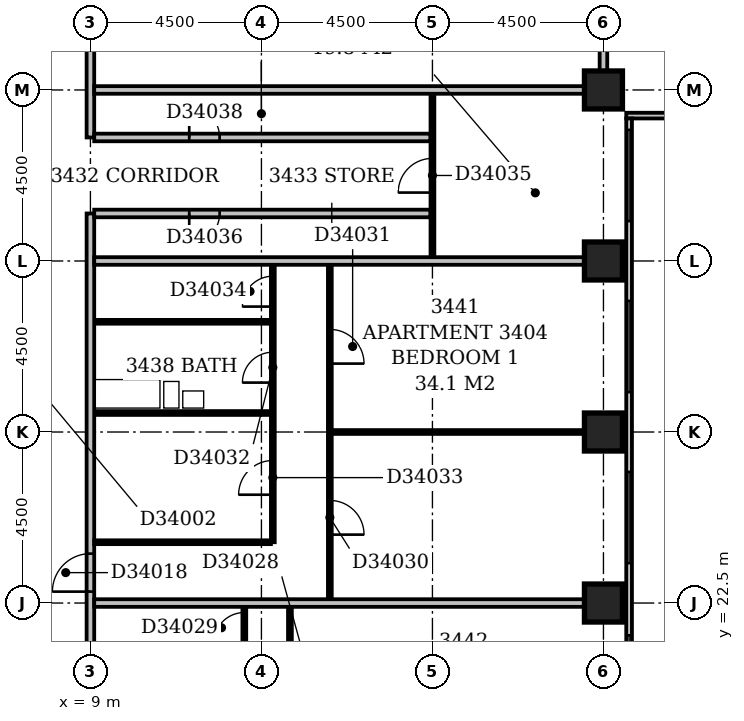
"""IFC4 building model, lengths in metres.
Left out: names, types, materials, properties, quantities, classifications, styles, units other than length and angle.
Written with IfcOpenShell. Run it as: python <this file> out.ifc"""

import sys

from ifc_helpers import new_model, si_unit, direction, frame, frame_2d, origin, origin_2d, place, context, subcontext, project, spatial, rectangle, extrude, element, fill, save


model = new_model("IFC4")
c1 = context("Model", 3, precision=1e-05, world=origin(), true_north=direction((0.0, 1.0)))
c2 = subcontext(c1, "Body", "Model", "MODEL_VIEW")
j1 = project(units=[si_unit("LENGTHUNIT", "METRE"), si_unit("PLANEANGLEUNIT", "RADIAN")], contexts=[c1])
p1 = place(None, origin())
s1 = spatial("IfcSite", under=j1, at=p1, CompositionType="ELEMENT")
p2 = place(p1, origin())
s2 = spatial("IfcBuilding", under=s1, at=p2, CompositionType="ELEMENT")
p3 = place(p2, frame((0.0, 0.0, 137.6)))
s3 = spatial("IfcBuildingStorey", under=s2, at=p3, CompositionType="ELEMENT", Elevation=137.6)
for number, where, z_axis, x_axis in (
    (1, (22.5, 22.5, -0.3), (0.0, 0.0, 1.0), (1.0, 0.0, 0.0)),
    (2, (22.5, 27.0, -0.3), (0.0, 0.0, 1.0), (1.0, 0.0, 0.0)),
    (3, (22.5, 31.5, -0.3), (0.0, 0.0, 1.0), (1.0, 0.0, 0.0)),
    (4, (22.5, 36.0, -0.3), (0.0, 0.0, 1.0), (1.0, 0.0, 0.0)),
):
    element("IfcColumn", number, at=place(p3, frame(where, z_axis=z_axis, x_axis=x_axis)), inside=s3, PredefinedType="COLUMN", context=c2, shape_type="SweptSolid", body=[
        extrude(rectangle(XDim=1.0, YDim=1.0, at=origin_2d()), origin(), (0.0, 0.0, 1.0), 3.6),
    ])
p4 = place(p3, frame((23.175, 17.4, 0.0), z_axis=(0.0, 0.0, 1.0), x_axis=(0.0, 1.0, 0.0)))
e5 = element("IfcWall", 5, at=p4, inside=s3, PredefinedType="STANDARD", context=c2, shape_type="SweptSolid", body=[
    extrude(rectangle(XDim=17.85, YDim=0.15, at=frame_2d((8.925, 0.0))), origin(), (0.0, 0.0, 1.0), 2.7),
])
p5 = place(p4, frame((3.05, 0.0, 0.6)))
e6 = element("IfcOpeningElement", 6, at=p5, cuts=e5, PredefinedType="OPENING", context=c2, shape_type="SweptSolid", body=[
    extrude(rectangle(XDim=1.2, YDim=1.8, at=frame_2d((0.6, 0.9))), frame((0.0, 0.087, 0.0), z_axis=(0.0, -1.0, 0.0), x_axis=(1.0, 0.0, 0.0)), (0.0, 0.0, 1.0), 0.174),
])
p6 = place(p4, frame((6.15, 0.0, 0.6)))
e7 = element("IfcOpeningElement", 7, at=p6, cuts=e5, PredefinedType="OPENING", context=c2, shape_type="SweptSolid", body=[
    extrude(rectangle(XDim=2.4, YDim=1.8, at=frame_2d((1.2, 0.9))), frame((0.0, 0.087, 0.0), z_axis=(0.0, -1.0, 0.0), x_axis=(1.0, 0.0, 0.0)), (0.0, 0.0, 1.0), 0.174),
])
p7 = place(p4, frame((10.65, 0.0, 0.6)))
e8 = element("IfcOpeningElement", 8, at=p7, cuts=e5, PredefinedType="OPENING", context=c2, shape_type="SweptSolid", body=[
    extrude(rectangle(XDim=2.4, YDim=1.8, at=frame_2d((1.2, 0.9))), frame((0.0, 0.087, 0.0), z_axis=(0.0, -1.0, 0.0), x_axis=(1.0, 0.0, 0.0)), (0.0, 0.0, 1.0), 0.174),
])
p8 = place(p4, frame((15.15, 0.0, 0.6)))
e9 = element("IfcOpeningElement", 9, at=p8, cuts=e5, PredefinedType="OPENING", context=c2, shape_type="SweptSolid", body=[
    extrude(rectangle(XDim=2.4, YDim=1.8, at=frame_2d((1.2, 0.9))), frame((0.0, 0.087, 0.0), z_axis=(0.0, -1.0, 0.0), x_axis=(1.0, 0.0, 0.0)), (0.0, 0.0, 1.0), 0.174),
])
p9 = place(p3, frame((23.1, 35.325, 0.0), z_axis=(0.0, 0.0, 1.0), x_axis=(1.0, 0.0, 0.0)))
e10 = element("IfcWall", 10, at=p9, inside=s3, PredefinedType="STANDARD", context=c2, shape_type="SweptSolid", body=[
    extrude(rectangle(XDim=45.15, YDim=0.15, at=frame_2d((22.575, 0.0))), origin(), (0.0, 0.0, 1.0), 2.7),
])
p10 = place(p9, frame((2.235, 0.0, 0.6)))
e11 = element("IfcOpeningElement", 11, at=p10, cuts=e10, PredefinedType="OPENING", context=c2, shape_type="SweptSolid", body=[
    extrude(rectangle(XDim=0.9, YDim=1.8, at=frame_2d((0.45, 0.9))), frame((0.0, 0.087, 0.0), z_axis=(0.0, -1.0, 0.0), x_axis=(1.0, 0.0, 0.0)), (0.0, 0.0, 1.0), 0.174),
])
p11 = place(p9, frame((4.95, 0.0, 0.6)))
e12 = element("IfcOpeningElement", 12, at=p11, cuts=e10, PredefinedType="OPENING", context=c2, shape_type="SweptSolid", body=[
    extrude(rectangle(XDim=2.4, YDim=1.8, at=frame_2d((1.2, 0.9))), frame((0.0, 0.087, 0.0), z_axis=(0.0, -1.0, 0.0), x_axis=(1.0, 0.0, 0.0)), (0.0, 0.0, 1.0), 0.174),
])
p12 = place(p9, frame((9.45, 0.0, 0.6)))
e13 = element("IfcOpeningElement", 13, at=p12, cuts=e10, PredefinedType="OPENING", context=c2, shape_type="SweptSolid", body=[
    extrude(rectangle(XDim=2.4, YDim=1.8, at=frame_2d((1.2, 0.9))), frame((0.0, 0.087, 0.0), z_axis=(0.0, -1.0, 0.0), x_axis=(1.0, 0.0, 0.0)), (0.0, 0.0, 1.0), 0.174),
])
p13 = place(p9, frame((13.95, 0.0, 0.6)))
e14 = element("IfcOpeningElement", 14, at=p13, cuts=e10, PredefinedType="OPENING", context=c2, shape_type="SweptSolid", body=[
    extrude(rectangle(XDim=2.4, YDim=1.8, at=frame_2d((1.2, 0.9))), frame((0.0, 0.087, 0.0), z_axis=(0.0, -1.0, 0.0), x_axis=(1.0, 0.0, 0.0)), (0.0, 0.0, 1.0), 0.174),
])
p14 = place(p9, frame((18.45, 0.0, 0.6)))
e15 = element("IfcOpeningElement", 15, at=p14, cuts=e10, PredefinedType="OPENING", context=c2, shape_type="SweptSolid", body=[
    extrude(rectangle(XDim=2.4, YDim=1.8, at=frame_2d((1.2, 0.9))), frame((0.0, 0.087, 0.0), z_axis=(0.0, -1.0, 0.0), x_axis=(1.0, 0.0, 0.0)), (0.0, 0.0, 1.0), 0.174),
])
p15 = place(p9, frame((22.66, 0.0, 0.6)))
e16 = element("IfcOpeningElement", 16, at=p15, cuts=e10, PredefinedType="OPENING", context=c2, shape_type="SweptSolid", body=[
    extrude(rectangle(XDim=1.8, YDim=1.8, at=frame_2d((0.9, 0.9))), frame((0.0, 0.087, 0.0), z_axis=(0.0, -1.0, 0.0), x_axis=(1.0, 0.0, 0.0)), (0.0, 0.0, 1.0), 0.174),
])
p16 = place(p9, frame((28.911, 0.0, 0.6)))
e17 = element("IfcOpeningElement", 17, at=p16, cuts=e10, PredefinedType="OPENING", context=c2, shape_type="SweptSolid", body=[
    extrude(rectangle(XDim=1.2, YDim=1.8, at=frame_2d((0.6, 0.9))), frame((0.0, 0.087, 0.0), z_axis=(0.0, -1.0, 0.0), x_axis=(1.0, 0.0, 0.0)), (0.0, 0.0, 1.0), 0.174),
])
p17 = place(p9, frame((31.95, 0.0, 0.6)))
e18 = element("IfcOpeningElement", 18, at=p17, cuts=e10, PredefinedType="OPENING", context=c2, shape_type="SweptSolid", body=[
    extrude(rectangle(XDim=2.4, YDim=1.8, at=frame_2d((1.2, 0.9))), frame((0.0, 0.087, 0.0), z_axis=(0.0, -1.0, 0.0), x_axis=(1.0, 0.0, 0.0)), (0.0, 0.0, 1.0), 0.174),
])
p18 = place(p9, frame((36.45, 0.0, 0.6)))
e19 = element("IfcOpeningElement", 19, at=p18, cuts=e10, PredefinedType="OPENING", context=c2, shape_type="SweptSolid", body=[
    extrude(rectangle(XDim=2.4, YDim=1.8, at=frame_2d((1.2, 0.9))), frame((0.0, 0.087, 0.0), z_axis=(0.0, -1.0, 0.0), x_axis=(1.0, 0.0, 0.0)), (0.0, 0.0, 1.0), 0.174),
])
p19 = place(p9, frame((40.95, 0.0, 0.6)))
e20 = element("IfcOpeningElement", 20, at=p19, cuts=e10, PredefinedType="OPENING", context=c2, shape_type="SweptSolid", body=[
    extrude(rectangle(XDim=2.4, YDim=1.8, at=frame_2d((1.2, 0.9))), frame((0.0, 0.087, 0.0), z_axis=(0.0, -1.0, 0.0), x_axis=(1.0, 0.0, 0.0)), (0.0, 0.0, 1.0), 0.174),
])
p20 = place(p3, frame((9.0, 5.0, 0.0), z_axis=(0.0, 0.0, 1.0), x_axis=(0.0, 1.0, 0.0)))
e21 = element("IfcWall", 21, at=p20, inside=s3, PredefinedType="PARTITIONING", context=c2, shape_type="SweptSolid", body=[
    extrude(rectangle(XDim=27.75, YDim=0.2, at=frame_2d((13.875, 0.0))), origin(), (0.0, 0.0, 1.0), 3.3),
])
p21 = place(p20, frame((17.8, 0.0, 0.0)))
e22 = element("IfcOpeningElement", 22, at=p21, cuts=e21, PredefinedType="OPENING", context=c2, shape_type="SweptSolid", body=[
    extrude(rectangle(XDim=1.0, YDim=2.1, at=frame_2d((0.5, 1.05))), frame((0.0, 0.112, 0.0), z_axis=(0.0, -1.0, 0.0), x_axis=(1.0, 0.0, 0.0)), (0.0, 0.0, 1.0), 0.224),
])
p22 = place(p20, frame((14.95, 0.0, 0.0)))
e23 = element("IfcOpeningElement", 23, at=p22, cuts=e21, PredefinedType="OPENING", context=c2, shape_type="SweptSolid", body=[
    extrude(rectangle(XDim=1.0, YDim=2.1, at=frame_2d((0.5, 1.05))), frame((0.0, 0.112, 0.0), z_axis=(0.0, -1.0, 0.0), x_axis=(1.0, 0.0, 0.0)), (0.0, 0.0, 1.0), 0.224),
])
p23 = place(p20, frame((11.7, 0.0, 0.0)))
e24 = element("IfcOpeningElement", 24, at=p23, cuts=e21, PredefinedType="OPENING", context=c2, shape_type="SweptSolid", body=[
    extrude(rectangle(XDim=1.0, YDim=2.1, at=frame_2d((0.5, 1.05))), frame((0.0, 0.112, 0.0), z_axis=(0.0, -1.0, 0.0), x_axis=(1.0, 0.0, 0.0)), (0.0, 0.0, 1.0), 0.224),
])
p24 = place(p20, frame((1.5, 0.0, 0.0)))
e25 = element("IfcOpeningElement", 25, at=p24, cuts=e21, PredefinedType="OPENING", context=c2, shape_type="SweptSolid", body=[
    extrude(rectangle(XDim=0.9, YDim=2.1, at=frame_2d((0.45, 1.05))), frame((0.0, 0.112, 0.0), z_axis=(0.0, -1.0, 0.0), x_axis=(1.0, 0.0, 0.0)), (0.0, 0.0, 1.0), 0.224),
])
p25 = place(p3, frame((14.25, 18.1, 0.0), z_axis=(0.0, 0.0, 1.0), x_axis=(0.0, 1.0, 0.0)))
e26 = element("IfcWall", 26, at=p25, inside=s3, PredefinedType="PARTITIONING", context=c2, shape_type="SweptSolid", body=[
    extrude(rectangle(XDim=4.3, YDim=0.1, at=frame_2d((2.15, 0.0))), origin(), (0.0, 0.0, 1.0), 3.3),
])
p26 = place(p25, frame((1.7, 0.0, 0.0)))
e27 = element("IfcOpeningElement", 27, at=p26, cuts=e26, PredefinedType="OPENING", context=c2, shape_type="SweptSolid", body=[
    extrude(rectangle(XDim=0.9, YDim=2.1, at=frame_2d((0.45, 1.05))), frame((0.0, 0.062, 0.0), z_axis=(0.0, -1.0, 0.0), x_axis=(1.0, 0.0, 0.0)), (0.0, 0.0, 1.0), 0.124),
])
p27 = place(p3, frame((13.05, 21.2, 0.0), z_axis=(0.0, 0.0, 1.0), x_axis=(0.0, 1.0, 0.0)))
e28 = element("IfcWall", 28, at=p27, inside=s3, PredefinedType="PARTITIONING", context=c2, shape_type="SweptSolid", body=[
    extrude(rectangle(XDim=1.2, YDim=0.1, at=frame_2d((0.6, 0.0))), origin(), (0.0, 0.0, 1.0), 3.3),
])
p28 = place(p27, frame((0.25, 0.0, 0.0)))
e29 = element("IfcOpeningElement", 29, at=p28, cuts=e28, PredefinedType="OPENING", context=c2, shape_type="SweptSolid", body=[
    extrude(rectangle(XDim=0.8, YDim=2.1, at=frame_2d((0.4, 1.05))), frame((0.0, 0.062, 0.0), z_axis=(0.0, -1.0, 0.0), x_axis=(1.0, 0.0, 0.0)), (0.0, 0.0, 1.0), 0.124),
])
p29 = place(p3, frame((9.1, 22.5, 0.0), z_axis=(0.0, 0.0, 1.0), x_axis=(1.0, 0.0, 0.0)))
e30 = element("IfcWall", 30, at=p29, inside=s3, PredefinedType="PARTITIONING", context=c2, shape_type="SweptSolid", body=[
    extrude(rectangle(XDim=12.9, YDim=0.2, at=frame_2d((6.45, 0.0))), origin(), (0.0, 0.0, 1.0), 3.3),
])
p30 = place(p3, frame((15.3, 22.6, 0.0), z_axis=(0.0, 0.0, 1.0), x_axis=(0.0, 1.0, 0.0)))
e31 = element("IfcWall", 31, at=p30, inside=s3, PredefinedType="PARTITIONING", context=c2, shape_type="SweptSolid", body=[
    extrude(rectangle(XDim=8.8, YDim=0.1, at=frame_2d((4.4, 0.0))), origin(), (0.0, 0.0, 1.0), 3.3),
])
p31 = place(p30, frame((1.7, 0.0, 0.0)))
e32 = element("IfcOpeningElement", 32, at=p31, cuts=e31, PredefinedType="OPENING", context=c2, shape_type="SweptSolid", body=[
    extrude(rectangle(XDim=0.9, YDim=2.1, at=frame_2d((0.45, 1.05))), frame((0.0, 0.062, 0.0), z_axis=(0.0, -1.0, 0.0), x_axis=(1.0, 0.0, 0.0)), (0.0, 0.0, 1.0), 0.124),
])
p32 = place(p30, frame((6.2, 0.0, 0.0)))
e33 = element("IfcOpeningElement", 33, at=p32, cuts=e31, PredefinedType="OPENING", context=c2, shape_type="SweptSolid", body=[
    extrude(rectangle(XDim=0.9, YDim=2.1, at=frame_2d((0.45, 1.05))), frame((0.0, 0.062, 0.0), z_axis=(0.0, -1.0, 0.0), x_axis=(1.0, 0.0, 0.0)), (0.0, 0.0, 1.0), 0.124),
])
p33 = place(p3, frame((9.1, 24.1, 0.0), z_axis=(0.0, 0.0, 1.0), x_axis=(1.0, 0.0, 0.0)))
e34 = element("IfcWall", 34, at=p33, inside=s3, PredefinedType="PARTITIONING", context=c2, shape_type="SweptSolid", body=[
    extrude(rectangle(XDim=4.65, YDim=0.1, at=frame_2d((2.325, 0.0))), origin(), (0.0, 0.0, 1.0), 3.3),
])
p34 = place(p3, frame((13.8, 24.1, 0.0), z_axis=(0.0, 0.0, 1.0), x_axis=(0.0, 1.0, 0.0)))
e35 = element("IfcWall", 35, at=p34, inside=s3, PredefinedType="PARTITIONING", context=c2, shape_type="SweptSolid", body=[
    extrude(rectangle(XDim=7.3, YDim=0.1, at=frame_2d((3.65, 0.0))), origin(), (0.0, 0.0, 1.0), 3.3),
])
p35 = place(p34, frame((4.2, 0.0, 0.0)))
e36 = element("IfcOpeningElement", 36, at=p35, cuts=e35, PredefinedType="OPENING", context=c2, shape_type="SweptSolid", body=[
    extrude(rectangle(XDim=0.8, YDim=2.1, at=frame_2d((0.4, 1.05))), frame((0.0, 0.062, 0.0), z_axis=(0.0, -1.0, 0.0), x_axis=(1.0, 0.0, 0.0)), (0.0, 0.0, 1.0), 0.124),
])
p36 = place(p34, frame((1.25, 0.0, 0.0)))
e37 = element("IfcOpeningElement", 37, at=p36, cuts=e35, PredefinedType="OPENING", context=c2, shape_type="SweptSolid", body=[
    extrude(rectangle(XDim=0.9, YDim=2.1, at=frame_2d((0.45, 1.05))), frame((0.0, 0.062, 0.0), z_axis=(0.0, -1.0, 0.0), x_axis=(1.0, 0.0, 0.0)), (0.0, 0.0, 1.0), 0.124),
])
p37 = place(p34, frame((6.2, 0.0, 0.0)))
e38 = element("IfcOpeningElement", 38, at=p37, cuts=e35, PredefinedType="OPENING", context=c2, shape_type="SweptSolid", body=[
    extrude(rectangle(XDim=0.8, YDim=2.1, at=frame_2d((0.4, 1.05))), frame((0.0, 0.062, 0.0), z_axis=(0.0, -1.0, 0.0), x_axis=(1.0, 0.0, 0.0)), (0.0, 0.0, 1.0), 0.124),
])
p38 = place(p3, frame((15.35, 27.0, 0.0), z_axis=(0.0, 0.0, 1.0), x_axis=(1.0, 0.0, 0.0)))
e39 = element("IfcWall", 39, at=p38, inside=s3, PredefinedType="PARTITIONING", context=c2, shape_type="SweptSolid", body=[
    extrude(rectangle(XDim=6.65, YDim=0.1, at=frame_2d((3.325, 0.0))), origin(), (0.0, 0.0, 1.0), 2.7),
])
p39 = place(p3, frame((9.1, 27.5, 0.0), z_axis=(0.0, 0.0, 1.0), x_axis=(1.0, 0.0, 0.0)))
e40 = element("IfcWall", 40, at=p39, inside=s3, PredefinedType="PLUMBINGWALL", context=c2, shape_type="SweptSolid", body=[
    extrude(rectangle(XDim=4.65, YDim=0.1, at=frame_2d((2.325, 0.0))), origin(), (0.0, 0.0, 1.0), 2.7),
])
p40 = place(p3, frame((9.1, 29.9, 0.0), z_axis=(0.0, 0.0, 1.0), x_axis=(1.0, 0.0, 0.0)))
e41 = element("IfcWall", 41, at=p40, inside=s3, PredefinedType="PLUMBINGWALL", context=c2, shape_type="SweptSolid", body=[
    extrude(rectangle(XDim=4.65, YDim=0.1, at=frame_2d((2.325, 0.0))), origin(), (0.0, 0.0, 1.0), 3.3),
])
p41 = place(p3, frame((9.1, 31.5, 0.0), z_axis=(0.0, 0.0, 1.0), x_axis=(1.0, 0.0, 0.0)))
e42 = element("IfcWall", 42, at=p41, inside=s3, PredefinedType="PARTITIONING", context=c2, shape_type="SweptSolid", body=[
    extrude(rectangle(XDim=12.9, YDim=0.2, at=frame_2d((6.45, 0.0))), origin(), (0.0, 0.0, 1.0), 3.3),
])
p42 = place(p3, frame((18.0, 31.6, 0.0), z_axis=(0.0, 0.0, 1.0), x_axis=(0.0, 1.0, 0.0)))
e43 = element("IfcWall", 43, at=p42, inside=s3, PredefinedType="PARTITIONING", context=c2, shape_type="SweptSolid", body=[
    extrude(rectangle(XDim=4.3, YDim=0.1, at=frame_2d((2.15, 0.0))), origin(), (0.0, 0.0, 1.0), 3.3),
])
p43 = place(p42, frame((1.7, 0.0, 0.0)))
e44 = element("IfcOpeningElement", 44, at=p43, cuts=e43, PredefinedType="OPENING", context=c2, shape_type="SweptSolid", body=[
    extrude(rectangle(XDim=0.9, YDim=2.1, at=frame_2d((0.45, 1.05))), frame((0.0, 0.062, 0.0), z_axis=(0.0, -1.0, 0.0), x_axis=(1.0, 0.0, 0.0)), (0.0, 0.0, 1.0), 0.124),
])
p44 = place(p3, frame((9.1, 32.75, 0.0), z_axis=(0.0, 0.0, 1.0), x_axis=(1.0, 0.0, 0.0)))
e45 = element("IfcWall", 45, at=p44, inside=s3, PredefinedType="PARTITIONING", context=c2, shape_type="SweptSolid", body=[
    extrude(rectangle(XDim=8.85, YDim=0.2, at=frame_2d((4.425, 0.0))), origin(), (0.0, 0.0, 1.0), 3.3),
])
p45 = place(p44, frame((2.5, 0.0, 0.0)))
e46 = element("IfcOpeningElement", 46, at=p45, cuts=e45, PredefinedType="OPENING", context=c2, shape_type="SweptSolid", body=[
    extrude(rectangle(XDim=0.8, YDim=2.1, at=frame_2d((0.4, 1.05))), frame((0.0, 0.112, 0.0), z_axis=(0.0, -1.0, 0.0), x_axis=(1.0, 0.0, 0.0)), (0.0, 0.0, 1.0), 0.224),
])
p46 = place(p3, frame((9.0, 34.75, 0.0), z_axis=(0.0, 0.0, 1.0), x_axis=(0.0, 1.0, 0.0)))
e47 = element("IfcWall", 47, at=p46, inside=s3, PredefinedType="PARTITIONING", context=c2, shape_type="SweptSolid", body=[
    extrude(rectangle(XDim=14.75, YDim=0.2, at=frame_2d((7.375, 0.0))), origin(), (0.0, 0.0, 1.0), 3.3),
])
p47 = place(p46, frame((5.25, 0.0, 0.0)))
e48 = element("IfcOpeningElement", 48, at=p47, cuts=e47, PredefinedType="OPENING", context=c2, shape_type="SweptSolid", body=[
    extrude(rectangle(XDim=0.9, YDim=2.1, at=frame_2d((0.45, 1.05))), frame((0.0, 0.112, 0.0), z_axis=(0.0, -1.0, 0.0), x_axis=(1.0, 0.0, 0.0)), (0.0, 0.0, 1.0), 0.224),
])
p48 = place(p3, frame((9.1, 34.75, 0.0), z_axis=(0.0, 0.0, 1.0), x_axis=(1.0, 0.0, 0.0)))
e49 = element("IfcWall", 49, at=p48, inside=s3, PredefinedType="PARTITIONING", context=c2, shape_type="SweptSolid", body=[
    extrude(rectangle(XDim=8.85, YDim=0.2, at=frame_2d((4.425, 0.0))), origin(), (0.0, 0.0, 1.0), 3.3),
])
p49 = place(p48, frame((2.5, 0.0, 0.0)))
e50 = element("IfcOpeningElement", 50, at=p49, cuts=e49, PredefinedType="OPENING", context=c2, shape_type="SweptSolid", body=[
    extrude(rectangle(XDim=0.8, YDim=2.1, at=frame_2d((0.4, 1.05))), frame((0.0, 0.112, 0.0), z_axis=(0.0, -1.0, 0.0), x_axis=(1.0, 0.0, 0.0)), (0.0, 0.0, 1.0), 0.224),
])
for number, where, z_axis, x_axis in (
    (51, (9.1, 36.0, 0.0), (0.0, 0.0, 1.0), (1.0, 0.0, 0.0)),
    (52, (22.5, 36.5, 0.0), (0.0, 0.0, 1.0), (0.0, 1.0, 0.0)),
):
    element("IfcWall", number, at=place(p3, frame(where, z_axis=z_axis, x_axis=x_axis)), inside=s3, PredefinedType="PARTITIONING", context=c2, shape_type="SweptSolid", body=[
        extrude(rectangle(XDim=12.9, YDim=0.2, at=frame_2d((6.45, 0.0))), origin(), (0.0, 0.0, 1.0), 3.3),
    ])
p50 = place(p5, origin())
e53 = element("IfcWindow", 53, at=p50, inside=s3, PartitioningType="SINGLE_PANEL", PredefinedType="WINDOW", context=c2, shape_type="SweptSolid", body=[
    extrude(rectangle(XDim=1.2, YDim=1.8, at=frame_2d((0.6, 0.9))), frame((0.0, 0.03, 0.0), z_axis=(0.0, -1.0, 0.0), x_axis=(1.0, 0.0, 0.0)), (0.0, 0.0, 1.0), 0.06),
])
fill(e6, e53)
p51 = place(p6, origin())
e54 = element("IfcWindow", 54, at=p51, inside=s3, PartitioningType="SINGLE_PANEL", PredefinedType="WINDOW", context=c2, shape_type="SweptSolid", body=[
    extrude(rectangle(XDim=2.4, YDim=1.8, at=frame_2d((1.2, 0.9))), frame((0.0, 0.03, 0.0), z_axis=(0.0, -1.0, 0.0), x_axis=(1.0, 0.0, 0.0)), (0.0, 0.0, 1.0), 0.06),
])
fill(e7, e54)
p52 = place(p7, origin())
e55 = element("IfcWindow", 55, at=p52, inside=s3, PartitioningType="SINGLE_PANEL", PredefinedType="WINDOW", context=c2, shape_type="SweptSolid", body=[
    extrude(rectangle(XDim=2.4, YDim=1.8, at=frame_2d((1.2, 0.9))), frame((0.0, 0.03, 0.0), z_axis=(0.0, -1.0, 0.0), x_axis=(1.0, 0.0, 0.0)), (0.0, 0.0, 1.0), 0.06),
])
fill(e8, e55)
p53 = place(p8, origin())
e56 = element("IfcWindow", 56, at=p53, inside=s3, PartitioningType="SINGLE_PANEL", PredefinedType="WINDOW", context=c2, shape_type="SweptSolid", body=[
    extrude(rectangle(XDim=2.4, YDim=1.8, at=frame_2d((1.2, 0.9))), frame((0.0, 0.03, 0.0), z_axis=(0.0, -1.0, 0.0), x_axis=(1.0, 0.0, 0.0)), (0.0, 0.0, 1.0), 0.06),
])
fill(e9, e56)
p54 = place(p21, origin())
e57 = element("IfcDoor", 57, at=p54, inside=s3, OperationType="SINGLE_SWING_LEFT", PredefinedType="DOOR", context=c2, shape_type="SweptSolid", body=[
    extrude(rectangle(XDim=1.0, YDim=2.1, at=frame_2d((0.5, 1.05))), frame((0.0, 0.025, 0.0), z_axis=(0.0, -1.0, 0.0), x_axis=(1.0, 0.0, 0.0)), (0.0, 0.0, 1.0), 0.05),
])
fill(e22, e57)
p55 = place(p28, origin())
e58 = element("IfcDoor", 58, at=p55, inside=s3, OperationType="SINGLE_SWING_LEFT", PredefinedType="DOOR", context=c2, shape_type="SweptSolid", body=[
    extrude(rectangle(XDim=0.8, YDim=2.1, at=frame_2d((0.4, 1.05))), frame((0.0, 0.025, 0.0), z_axis=(0.0, -1.0, 0.0), x_axis=(1.0, 0.0, 0.0)), (0.0, 0.0, 1.0), 0.05),
])
fill(e29, e58)
p56 = place(p31, frame((0.9, 0.0, 0.0), z_axis=(0.0, 0.0, 1.0), x_axis=(-1.0, 0.0, 0.0)))
e59 = element("IfcDoor", 59, at=p56, inside=s3, OperationType="SINGLE_SWING_RIGHT", PredefinedType="DOOR", context=c2, shape_type="SweptSolid", body=[
    extrude(rectangle(XDim=0.9, YDim=2.1, at=frame_2d((0.45, 1.05))), frame((0.0, 0.025, 0.0), z_axis=(0.0, -1.0, 0.0), x_axis=(1.0, 0.0, 0.0)), (0.0, 0.0, 1.0), 0.05),
])
fill(e32, e59)
p57 = place(p32, frame((0.9, 0.0, 0.0), z_axis=(0.0, 0.0, 1.0), x_axis=(-1.0, 0.0, 0.0)))
e60 = element("IfcDoor", 60, at=p57, inside=s3, OperationType="SINGLE_SWING_RIGHT", PredefinedType="DOOR", context=c2, shape_type="SweptSolid", body=[
    extrude(rectangle(XDim=0.9, YDim=2.1, at=frame_2d((0.45, 1.05))), frame((0.0, 0.025, 0.0), z_axis=(0.0, -1.0, 0.0), x_axis=(1.0, 0.0, 0.0)), (0.0, 0.0, 1.0), 0.05),
])
fill(e33, e60)
p58 = place(p35, origin())
e61 = element("IfcDoor", 61, at=p58, inside=s3, OperationType="SINGLE_SWING_LEFT", PredefinedType="DOOR", context=c2, shape_type="SweptSolid", body=[
    extrude(rectangle(XDim=0.8, YDim=2.1, at=frame_2d((0.4, 1.05))), frame((0.0, 0.025, 0.0), z_axis=(0.0, -1.0, 0.0), x_axis=(1.0, 0.0, 0.0)), (0.0, 0.0, 1.0), 0.05),
])
fill(e36, e61)
p59 = place(p36, origin())
e62 = element("IfcDoor", 62, at=p59, inside=s3, OperationType="SINGLE_SWING_LEFT", PredefinedType="DOOR", context=c2, shape_type="SweptSolid", body=[
    extrude(rectangle(XDim=0.9, YDim=2.1, at=frame_2d((0.45, 1.05))), frame((0.0, 0.025, 0.0), z_axis=(0.0, -1.0, 0.0), x_axis=(1.0, 0.0, 0.0)), (0.0, 0.0, 1.0), 0.05),
])
fill(e37, e62)
p60 = place(p37, origin())
e63 = element("IfcDoor", 63, at=p60, inside=s3, OperationType="SINGLE_SWING_LEFT", PredefinedType="DOOR", context=c2, shape_type="SweptSolid", body=[
    extrude(rectangle(XDim=0.8, YDim=2.1, at=frame_2d((0.4, 1.05))), frame((0.0, 0.025, 0.0), z_axis=(0.0, -1.0, 0.0), x_axis=(1.0, 0.0, 0.0)), (0.0, 0.0, 1.0), 0.05),
])
fill(e38, e63)
p61 = place(p43, origin())
e64 = element("IfcDoor", 64, at=p61, inside=s3, OperationType="SINGLE_SWING_LEFT", PredefinedType="DOOR", context=c2, shape_type="SweptSolid", body=[
    extrude(rectangle(XDim=0.9, YDim=2.1, at=frame_2d((0.45, 1.05))), frame((0.0, 0.025, 0.0), z_axis=(0.0, -1.0, 0.0), x_axis=(1.0, 0.0, 0.0)), (0.0, 0.0, 1.0), 0.05),
])
fill(e44, e64)
p62 = place(p45, frame((0.8, 0.0, 0.0), z_axis=(0.0, 0.0, 1.0), x_axis=(-1.0, 0.0, 0.0)))
e65 = element("IfcDoor", 65, at=p62, inside=s3, OperationType="SINGLE_SWING_RIGHT", PredefinedType="DOOR", context=c2, shape_type="SweptSolid", body=[
    extrude(rectangle(XDim=0.8, YDim=2.1, at=frame_2d((0.4, 1.05))), frame((0.0, 0.025, 0.0), z_axis=(0.0, -1.0, 0.0), x_axis=(1.0, 0.0, 0.0)), (0.0, 0.0, 1.0), 0.05),
])
fill(e46, e65)
p63 = place(p49, origin())
e66 = element("IfcDoor", 66, at=p63, inside=s3, OperationType="SINGLE_SWING_LEFT", PredefinedType="DOOR", context=c2, shape_type="SweptSolid", body=[
    extrude(rectangle(XDim=0.8, YDim=2.1, at=frame_2d((0.4, 1.05))), frame((0.0, 0.025, 0.0), z_axis=(0.0, -1.0, 0.0), x_axis=(1.0, 0.0, 0.0)), (0.0, 0.0, 1.0), 0.05),
])
fill(e50, e66)
save(model, sys.argv[1])
